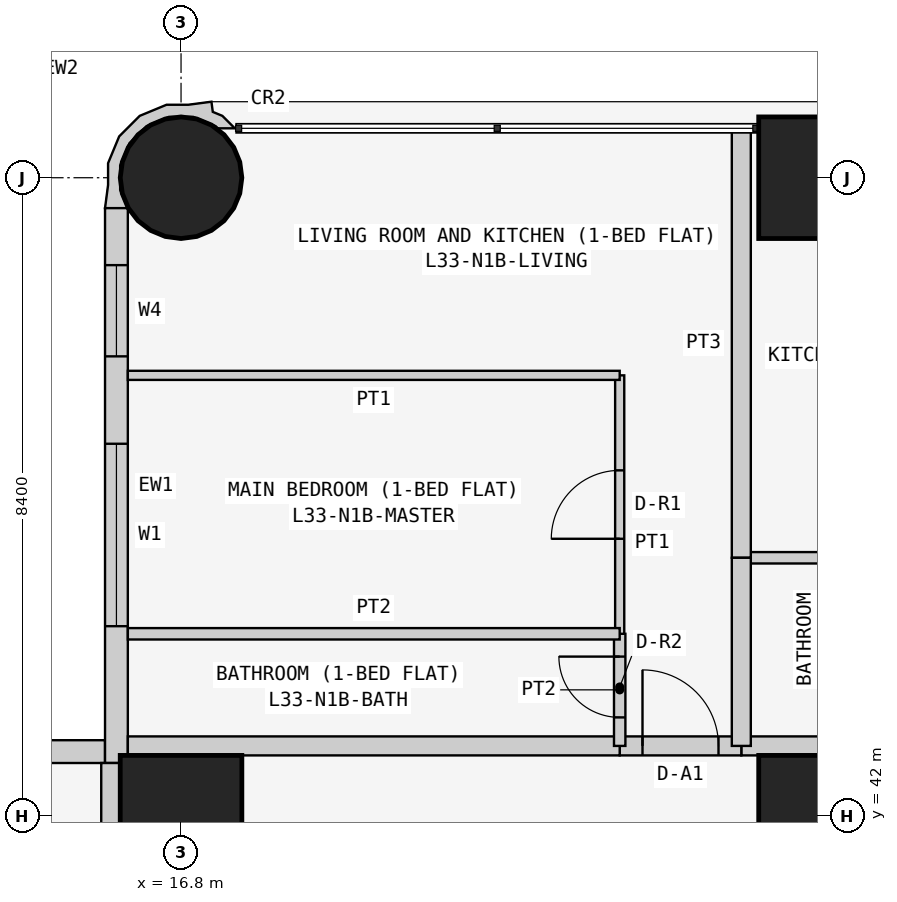
"""IFC4 building model, lengths in metres.
Left out: names, types, materials, properties, quantities, classifications, styles, units other than length and angle.
Written with IfcOpenShell. Run it as: python <this file> out.ifc"""

import sys

from ifc_helpers import new_model, si_unit, direction, frame, frame_2d, origin, origin_2d, place, context, subcontext, project, spatial, polyline, rectangle, circle, outline, extrude, element, fill, save


model = new_model("IFC4")
c1 = context("Model", 3, precision=1e-05, world=origin(), true_north=direction((0.0, 1.0)))
c2 = subcontext(c1, "Body", "Model", "MODEL_VIEW")
j1 = project(units=[si_unit("LENGTHUNIT", "METRE"), si_unit("PLANEANGLEUNIT", "RADIAN")], contexts=[c1])
p1 = place(None, origin())
s1 = spatial("IfcSite", under=j1, at=p1, CompositionType="ELEMENT")
p2 = place(p1, origin())
s2 = spatial("IfcBuilding", under=s1, at=p2, CompositionType="ELEMENT")
p3 = place(p2, frame((0.0, 0.0, 130.5)))
s3 = spatial("IfcBuildingStorey", under=s2, at=p3, CompositionType="ELEMENT", Elevation=130.5)
p4 = place(p3, frame((16.8, 42.0, 0.0), z_axis=(0.0, 0.0, 1.0), x_axis=(1.0, 0.0, 0.0)))
e1 = element("IfcColumn", 1, at=p4, inside=s3, PredefinedType="COLUMN", context=c2, shape_type="SweptSolid", body=[
    extrude(rectangle(XDim=1.6, YDim=1.6, at=origin_2d()), origin(), (0.0, 0.0, 1.0), 3.6),
])
p5 = place(p3, frame((16.8, 50.4, 0.0), z_axis=(0.0, 0.0, 1.0), x_axis=(1.0, 0.0, 0.0)))
e2 = element("IfcColumn", 2, at=p5, inside=s3, PredefinedType="COLUMN", context=c2, shape_type="SweptSolid", body=[
    extrude(circle(Radius=0.8, at=origin_2d()), origin(), (0.0, 0.0, 1.0), 3.6),
])
for number, where, z_axis, x_axis in (
    (3, (25.2, 42.0, 0.0), (0.0, 0.0, 1.0), (1.0, 0.0, 0.0)),
    (4, (25.2, 50.4, 0.0), (0.0, 0.0, 1.0), (1.0, 0.0, 0.0)),
):
    element("IfcColumn", number, at=place(p3, frame(where, z_axis=z_axis, x_axis=x_axis)), inside=s3, PredefinedType="COLUMN", context=c2, shape_type="SweptSolid", body=[
        extrude(rectangle(XDim=1.6, YDim=1.6, at=origin_2d()), origin(), (0.0, 0.0, 1.0), 3.6),
    ])
p6 = place(p3, frame((15.8, 42.85, 0.0), z_axis=(0.0, 0.0, 1.0), x_axis=(-1.0, 0.0, 0.0)))
e5 = element("IfcWall", 5, at=p6, inside=s3, PredefinedType="SOLIDWALL", context=c2, shape_type="SweptSolid", body=[
    extrude(rectangle(XDim=15.4, YDim=0.3, at=frame_2d((7.7, 0.0))), origin(), (0.0, 0.0, 1.0), 3.45),
])
p7 = place(p6, frame((1.2, 0.0, 0.9)))
e6 = element("IfcOpeningElement", 6, at=p7, cuts=e5, PredefinedType="OPENING", context=c2, shape_type="SweptSolid", body=[
    extrude(rectangle(XDim=1.8, YDim=1.5, at=frame_2d((0.9, 0.75))), frame((0.0, 0.16, 0.0), z_axis=(0.0, -1.0, 0.0), x_axis=(1.0, 0.0, 0.0)), (0.0, 0.0, 1.0), 0.32),
])
p8 = place(p6, frame((4.95, 0.0, 1.5)))
e7 = element("IfcOpeningElement", 7, at=p8, cuts=e5, PredefinedType="OPENING", context=c2, shape_type="SweptSolid", body=[
    extrude(rectangle(XDim=0.9, YDim=0.7, at=frame_2d((0.45, 0.35))), frame((0.0, 0.16, 0.0), z_axis=(0.0, -1.0, 0.0), x_axis=(1.0, 0.0, 0.0)), (0.0, 0.0, 1.0), 0.32),
])
p9 = place(p6, frame((8.5, 0.0, 0.9)))
e8 = element("IfcOpeningElement", 8, at=p9, cuts=e5, PredefinedType="OPENING", context=c2, shape_type="SweptSolid", body=[
    extrude(rectangle(XDim=1.8, YDim=1.5, at=frame_2d((0.9, 0.75))), frame((0.0, 0.16, 0.0), z_axis=(0.0, -1.0, 0.0), x_axis=(1.0, 0.0, 0.0)), (0.0, 0.0, 1.0), 0.32),
])
p10 = place(p6, frame((12.5, 0.0, 0.0)))
e9 = element("IfcOpeningElement", 9, at=p10, cuts=e5, PredefinedType="OPENING", context=c2, shape_type="SweptSolid", body=[
    extrude(rectangle(XDim=0.9, YDim=2.4, at=frame_2d((0.45, 1.2))), frame((0.0, 0.16, 0.0), z_axis=(0.0, -1.0, 0.0), x_axis=(1.0, 0.0, 0.0)), (0.0, 0.0, 1.0), 0.32),
])
p11 = place(p6, frame((13.5, 0.0, 0.9)))
e10 = element("IfcOpeningElement", 10, at=p11, cuts=e5, PredefinedType="OPENING", context=c2, shape_type="SweptSolid", body=[
    extrude(rectangle(XDim=1.2, YDim=1.5, at=frame_2d((0.6, 0.75))), frame((0.0, 0.16, 0.0), z_axis=(0.0, -1.0, 0.0), x_axis=(1.0, 0.0, 0.0)), (0.0, 0.0, 1.0), 0.32),
])
p12 = place(p3, frame((15.95, 50.0, 0.0), z_axis=(0.0, 0.0, 1.0), x_axis=(0.0, -1.0, 0.0)))
e11 = element("IfcWall", 11, at=p12, inside=s3, PredefinedType="SOLIDWALL", context=c2, shape_type="SweptSolid", body=[
    extrude(rectangle(XDim=7.3, YDim=0.3, at=frame_2d((3.65, 0.0))), origin(), (0.0, 0.0, 1.0), 3.45),
])
p13 = place(p12, frame((3.1, 0.0, 0.9)))
e12 = element("IfcOpeningElement", 12, at=p13, cuts=e11, PredefinedType="OPENING", context=c2, shape_type="SweptSolid", body=[
    extrude(rectangle(XDim=2.4, YDim=1.5, at=frame_2d((1.2, 0.75))), frame((0.0, 0.16, 0.0), z_axis=(0.0, -1.0, 0.0), x_axis=(1.0, 0.0, 0.0)), (0.0, 0.0, 1.0), 0.32),
])
p14 = place(p12, frame((0.75, 0.0, 0.9)))
e13 = element("IfcOpeningElement", 13, at=p14, cuts=e11, PredefinedType="OPENING", context=c2, shape_type="SweptSolid", body=[
    extrude(rectangle(XDim=1.2, YDim=1.5, at=frame_2d((0.6, 0.75))), frame((0.0, 0.16, 0.0), z_axis=(0.0, -1.0, 0.0), x_axis=(1.0, 0.0, 0.0)), (0.0, 0.0, 1.0), 0.32),
])
p15 = place(p3, frame((17.448, 50.995, 0.0), z_axis=(0.0, 0.0, 1.0), x_axis=(-0.343276641956, 0.93923434088, 0.0)))
e14 = element("IfcWall", 14, at=p15, inside=s3, PredefinedType="SOLIDWALL", context=c2, shape_type="SweptSolid", body=[
    extrude(outline(polyline([(0.241, 0.023), (0.333, 0.124), (0.465, 0.094), (0.532, 0.393), (0.631, 0.663), (0.614, 1.045), (0.454, 1.391), (0.172, 1.649), (-0.098, 1.748), (-0.369, 1.89), (-0.509, 1.621), (-0.491, 1.615), (-0.479, 1.609), (-0.211, 1.62), (0.088, 1.511), (0.323, 1.295), (0.457, 1.006), (0.47, 0.688), (0.361, 0.389), (0.145, 0.154), (0.108, 0.137), (0.031, -0.075), (0.241, 0.023)])), origin(), (0.0, 0.0, 1.0), 3.45),
])
p16 = place(p3, frame((24.171, 42.925, 0.0), z_axis=(0.0, 0.0, 1.0), x_axis=(1.0, 0.0, 0.0)))
e15 = element("IfcWall", 15, at=p16, inside=s3, PredefinedType="PARTITIONING", context=c2, shape_type="SweptSolid", body=[
    extrude(rectangle(XDim=2.629, YDim=0.25, at=frame_2d((1.314, 0.0))), origin(), (0.0, 0.0, 1.0), 3.45),
])
p17 = place(p3, frame((22.571, 42.925, 0.0), z_axis=(0.0, 0.0, 1.0), x_axis=(1.0, 0.0, 0.0)))
e16 = element("IfcWall", 16, at=p17, inside=s3, PredefinedType="PARTITIONING", context=c2, shape_type="SweptSolid", body=[
    extrude(rectangle(XDim=1.6, YDim=0.25, at=frame_2d((0.8, 0.0))), origin(), (0.0, 0.0, 1.0), 3.45),
])
p18 = place(p17, frame((0.3, 0.0, 0.0)))
e17 = element("IfcOpeningElement", 17, at=p18, cuts=e16, PredefinedType="OPENING", context=c2, shape_type="SweptSolid", body=[
    extrude(rectangle(XDim=1.0, YDim=2.1, at=frame_2d((0.5, 1.05))), frame((0.0, 0.135, 0.0), z_axis=(0.0, -1.0, 0.0), x_axis=(1.0, 0.0, 0.0)), (0.0, 0.0, 1.0), 0.27),
])
for number, where, z_axis, x_axis in (
    (18, (16.1, 42.925, 0.0), (0.0, 0.0, 1.0), (1.0, 0.0, 0.0)),
    (19, (15.875, 36.229, 0.0), (0.0, 0.0, 1.0), (0.0, 1.0, 0.0)),
):
    element("IfcWall", number, at=place(p3, frame(where, z_axis=z_axis, x_axis=x_axis)), inside=s3, PredefinedType="PARTITIONING", context=c2, shape_type="SweptSolid", body=[
        extrude(rectangle(XDim=6.471, YDim=0.25, at=frame_2d((3.235, 0.0))), origin(), (0.0, 0.0, 1.0), 3.45),
    ])
p19 = place(p3, frame((26.8, 45.4, 0.0), z_axis=(0.0, 0.0, 1.0), x_axis=(-1.0, 0.0, 0.0)))
e20 = element("IfcWall", 20, at=p19, inside=s3, PredefinedType="PARTITIONING", context=c2, shape_type="SweptSolid", body=[
    extrude(rectangle(XDim=2.629, YDim=0.15, at=frame_2d((1.314, 0.0))), origin(), (0.0, 0.0, 1.0), 3.45),
])
p20 = place(p3, frame((24.171, 45.4, 0.0), z_axis=(0.0, 0.0, 1.0), x_axis=(0.0, 1.0, 0.0)))
e21 = element("IfcWall", 21, at=p20, inside=s3, PredefinedType="PARTITIONING", context=c2, shape_type="SweptSolid", body=[
    extrude(rectangle(XDim=5.65, YDim=0.25, at=frame_2d((2.825, 0.0))), origin(), (0.0, 0.0, 1.0), 3.45),
])
p21 = place(p3, frame((24.171, 45.4, 0.0), z_axis=(0.0, 0.0, 1.0), x_axis=(0.0, -1.0, 0.0)))
e22 = element("IfcWall", 22, at=p21, inside=s3, PredefinedType="PARTITIONING", context=c2, shape_type="SweptSolid", body=[
    extrude(rectangle(XDim=2.475, YDim=0.25, at=frame_2d((1.237, 0.0))), origin(), (0.0, 0.0, 1.0), 3.45),
])
p22 = place(p3, frame((22.571, 42.925, 0.0), z_axis=(0.0, 0.0, 1.0), x_axis=(0.0, 1.0, 0.0)))
e23 = element("IfcWall", 23, at=p22, inside=s3, PredefinedType="PARTITIONING", context=c2, shape_type="SweptSolid", body=[
    extrude(rectangle(XDim=1.475, YDim=0.15, at=frame_2d((0.737, 0.0))), origin(), (0.0, 0.0, 1.0), 3.45),
])
p23 = place(p22, frame((0.375, 0.0, 0.0)))
e24 = element("IfcOpeningElement", 24, at=p23, cuts=e23, PredefinedType="OPENING", context=c2, shape_type="SweptSolid", body=[
    extrude(rectangle(XDim=0.8, YDim=2.1, at=frame_2d((0.4, 1.05))), frame((0.0, 0.085, 0.0), z_axis=(0.0, -1.0, 0.0), x_axis=(1.0, 0.0, 0.0)), (0.0, 0.0, 1.0), 0.17),
])
p24 = place(p3, frame((22.571, 44.4, 0.0), z_axis=(0.0, 0.0, 1.0), x_axis=(0.0, 1.0, 0.0)))
e25 = element("IfcWall", 25, at=p24, inside=s3, PredefinedType="PARTITIONING", context=c2, shape_type="SweptSolid", body=[
    extrude(rectangle(XDim=3.4, YDim=0.12, at=frame_2d((1.7, 0.0))), origin(), (0.0, 0.0, 1.0), 3.45),
])
p25 = place(p24, frame((1.25, 0.0, 0.0)))
e26 = element("IfcOpeningElement", 26, at=p25, cuts=e25, PredefinedType="OPENING", context=c2, shape_type="SweptSolid", body=[
    extrude(rectangle(XDim=0.9, YDim=2.1, at=frame_2d((0.45, 1.05))), frame((0.0, 0.07, 0.0), z_axis=(0.0, -1.0, 0.0), x_axis=(1.0, 0.0, 0.0)), (0.0, 0.0, 1.0), 0.14),
])
p26 = place(p3, frame((22.571, 47.8, 0.0), z_axis=(0.0, 0.0, 1.0), x_axis=(-1.0, 0.0, 0.0)))
e27 = element("IfcWall", 27, at=p26, inside=s3, PredefinedType="PARTITIONING", context=c2, shape_type="SweptSolid", body=[
    extrude(rectangle(XDim=6.471, YDim=0.12, at=frame_2d((3.235, 0.0))), origin(), (0.0, 0.0, 1.0), 3.45),
])
p27 = place(p3, frame((22.571, 44.4, 0.0), z_axis=(0.0, 0.0, 1.0), x_axis=(-1.0, 0.0, 0.0)))
e28 = element("IfcWall", 28, at=p27, inside=s3, PredefinedType="PARTITIONING", context=c2, shape_type="SweptSolid", body=[
    extrude(rectangle(XDim=6.471, YDim=0.15, at=frame_2d((3.235, 0.0))), origin(), (0.0, 0.0, 1.0), 3.45),
])
p28 = place(p13, origin())
e29 = element("IfcWindow", 29, at=p28, inside=s3, PartitioningType="SINGLE_PANEL", PredefinedType="WINDOW", context=c2, shape_type="SweptSolid", body=[
    extrude(rectangle(XDim=2.4, YDim=1.5, at=frame_2d((1.2, 0.75))), frame((0.0, 0.03, 0.0), z_axis=(0.0, -1.0, 0.0), x_axis=(1.0, 0.0, 0.0)), (0.0, 0.0, 1.0), 0.06),
])
fill(e12, e29)
p29 = place(p14, origin())
e30 = element("IfcWindow", 30, at=p29, inside=s3, PartitioningType="SINGLE_PANEL", PredefinedType="WINDOW", context=c2, shape_type="SweptSolid", body=[
    extrude(rectangle(XDim=1.2, YDim=1.5, at=frame_2d((0.6, 0.75))), frame((0.0, 0.03, 0.0), z_axis=(0.0, -1.0, 0.0), x_axis=(1.0, 0.0, 0.0)), (0.0, 0.0, 1.0), 0.06),
])
fill(e13, e30)
p30 = place(p18, origin())
e31 = element("IfcDoor", 31, at=p30, inside=s3, OperationType="SINGLE_SWING_LEFT", PredefinedType="DOOR", context=c2, shape_type="SweptSolid", body=[
    extrude(rectangle(XDim=1.0, YDim=2.1, at=frame_2d((0.5, 1.05))), frame((0.0, 0.025, 0.0), z_axis=(0.0, -1.0, 0.0), x_axis=(1.0, 0.0, 0.0)), (0.0, 0.0, 1.0), 0.05),
])
fill(e17, e31)
p31 = place(p23, origin())
e32 = element("IfcDoor", 32, at=p31, inside=s3, OperationType="SINGLE_SWING_RIGHT", PredefinedType="DOOR", context=c2, shape_type="SweptSolid", body=[
    extrude(rectangle(XDim=0.8, YDim=2.1, at=frame_2d((0.4, 1.05))), frame((0.0, 0.025, 0.0), z_axis=(0.0, -1.0, 0.0), x_axis=(1.0, 0.0, 0.0)), (0.0, 0.0, 1.0), 0.05),
])
fill(e24, e32)
p32 = place(p25, origin())
e33 = element("IfcDoor", 33, at=p32, inside=s3, OperationType="SINGLE_SWING_LEFT", PredefinedType="DOOR", context=c2, shape_type="SweptSolid", body=[
    extrude(rectangle(XDim=0.9, YDim=2.1, at=frame_2d((0.45, 1.05))), frame((0.0, 0.025, 0.0), z_axis=(0.0, -1.0, 0.0), x_axis=(1.0, 0.0, 0.0)), (0.0, 0.0, 1.0), 0.05),
])
fill(e26, e33)
save(model, sys.argv[1])
